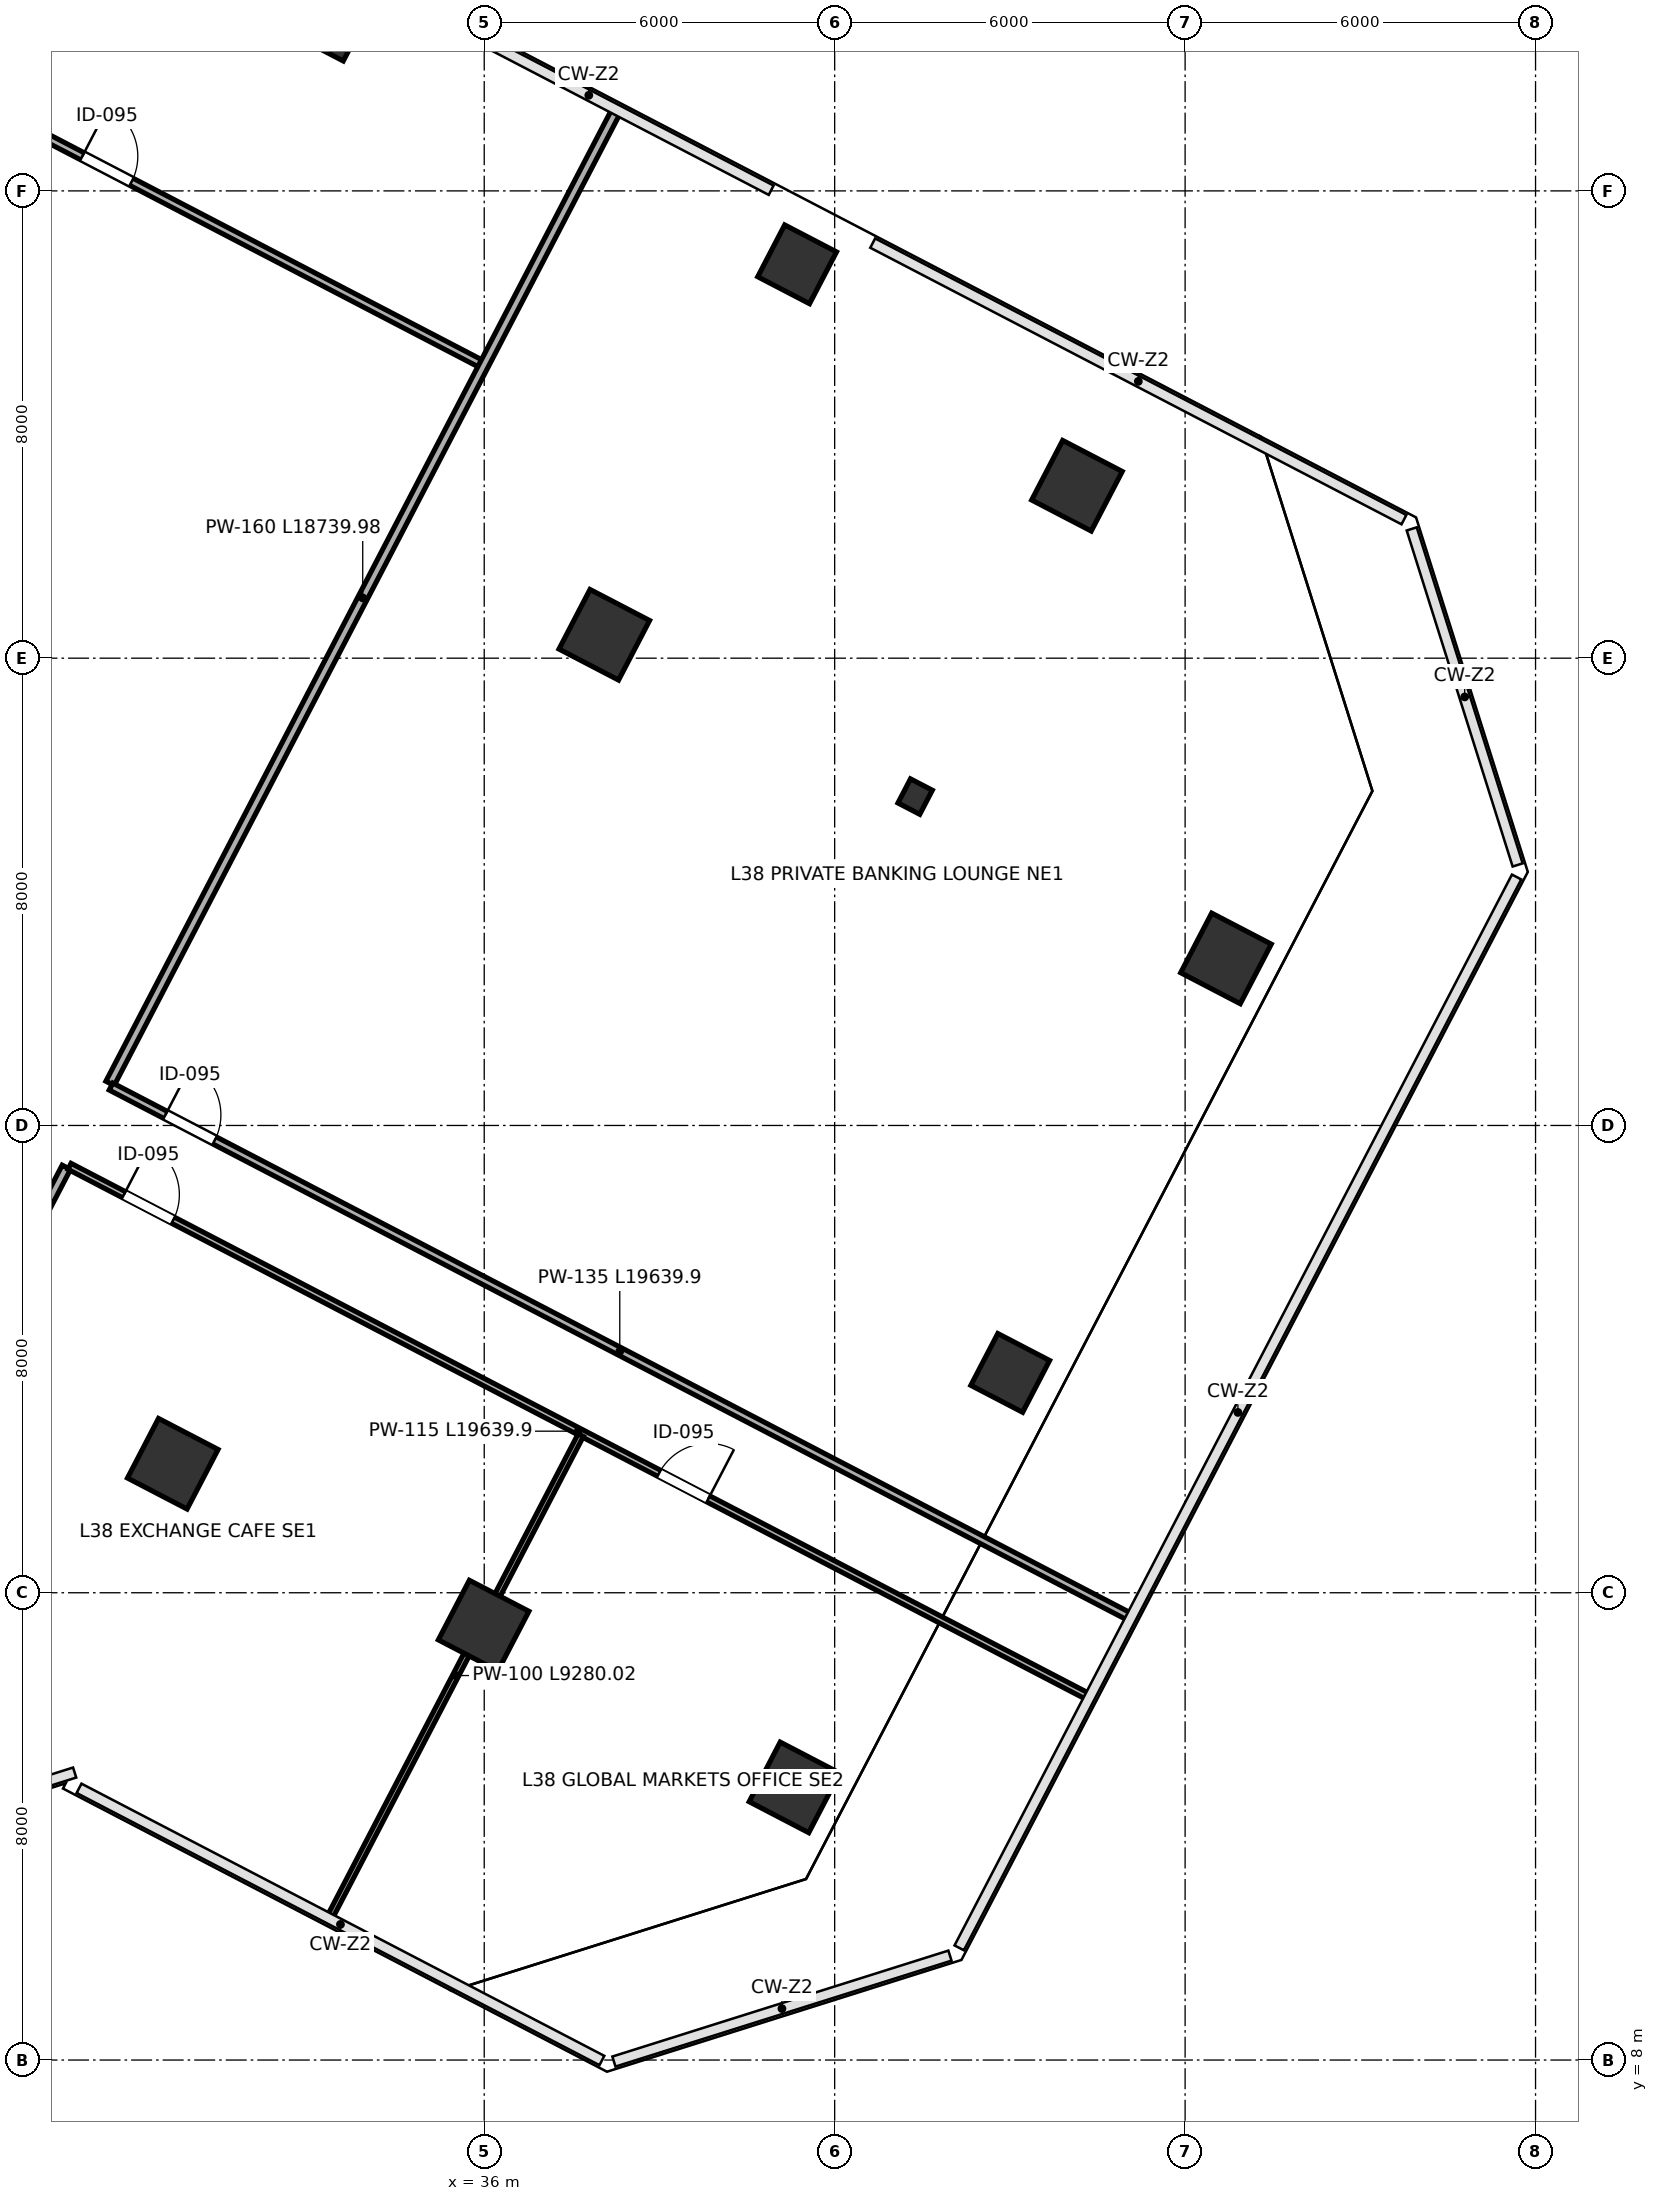
"""IFC4 building model, lengths in metres.
Left out: names, types, materials, properties, quantities, classifications, styles, units other than length and angle.
Written with IfcOpenShell. Run it as: python <this file> out.ifc"""

import sys

from ifc_helpers import new_model, si_unit, direction, frame, frame_2d, origin, origin_2d, place, context, subcontext, project, spatial, rectangle, i_section, extrude, clip, halfspace, source, transform, mapped, element, fill, save


model = new_model("IFC4")
c1 = context("Model", 3, precision=1e-05, world=origin(), true_north=direction((0.0, 1.0)))
c2 = subcontext(c1, "Body", "Model", "MODEL_VIEW")
j1 = project(units=[si_unit("LENGTHUNIT", "METRE"), si_unit("PLANEANGLEUNIT", "RADIAN")], contexts=[c1])
p1 = place(None, origin())
s1 = spatial("IfcSite", under=j1, at=p1, CompositionType="ELEMENT")
p2 = place(p1, origin())
s2 = spatial("IfcBuilding", under=s1, at=p2, CompositionType="ELEMENT")
p3 = place(p2, frame((0.0, 0.0, 170.8)))
s3 = spatial("IfcBuildingStorey", under=s2, at=p3, CompositionType="ELEMENT", Elevation=170.8)
p4 = place(p3, frame((33.374, 42.899, 0.0), z_axis=(0.055725496021, -0.062097434235, 0.996513210025), x_axis=(-0.96748864065, -0.2499629432, 0.038526059245)))
e1 = element("IfcColumn", 1, at=p4, inside=s3, PredefinedType="COLUMN", context=c2, shape_type="Clipping", body=[
    clip(clip(extrude(rectangle(XDim=1.0, YDim=1.0, at=origin_2d()), origin(), (0.0, 0.0, 1.0), 4.215), halfspace(frame((0.0, 0.0, 0.057), z_axis=(0.0, 0.0, -1.0), x_axis=(1.0, 0.0, 0.0)), False)), halfspace(frame((0.0, 0.0, 4.157), z_axis=(0.0, 0.0, 1.0), x_axis=(1.0, 0.0, 0.0)), False)),
])
p5 = place(p3, frame((30.668, 18.208, 0.0), z_axis=(-0.071930787685, -0.046679722121, 0.996316699311), x_axis=(-0.096954290528, 0.99450093611, 0.039594868666)))
e2 = element("IfcColumn", 2, at=p5, inside=s3, PredefinedType="COLUMN", context=c2, shape_type="Clipping", body=[
    clip(clip(extrude(rectangle(XDim=1.15, YDim=1.15, at=origin_2d()), origin(), (0.0, 0.0, 1.0), 4.216), halfspace(frame((0.0, 0.0, 0.067), z_axis=(0.0, 0.0, -1.0), x_axis=(1.0, 0.0, 0.0)), False)), halfspace(frame((0.0, 0.0, 4.148), z_axis=(0.0, 0.0, 1.0), x_axis=(1.0, 0.0, 0.0)), False)),
])
p6 = place(p3, frame((38.056, 32.401, 0.0), z_axis=(0.001100398588, -0.085657342736, 0.996324048068), x_axis=(-0.892847218174, 0.44861923, 0.039555422793)))
e3 = element("IfcColumn", 3, at=p6, inside=s3, PredefinedType="COLUMN", context=c2, shape_type="Clipping", body=[
    clip(clip(extrude(rectangle(XDim=1.15, YDim=1.15, at=origin_2d()), origin(), (0.0, 0.0, 1.0), 4.215), halfspace(frame((0.0, 0.0, 0.067), z_axis=(0.0, 0.0, -1.0), x_axis=(1.0, 0.0, 0.0)), False)), halfspace(frame((0.0, 0.0, 4.148), z_axis=(0.0, 0.0, 1.0), x_axis=(1.0, 0.0, 0.0)), False)),
])
p7 = place(p3, frame((41.357, 38.743, 0.0), z_axis=(0.03369013316, -0.102919600613, 0.994118972124), x_axis=(-0.985800109139, 0.160305053579, 0.050004345989)))
e4 = element("IfcColumn", 4, at=p7, inside=s3, PredefinedType="COLUMN", context=c2, shape_type="Clipping", body=[
    clip(clip(extrude(rectangle(XDim=1.0, YDim=1.0, at=origin_2d()), origin(), (0.0, 0.0, 1.0), 4.225), halfspace(frame((0.0, 0.0, 0.074), z_axis=(0.0, 0.0, -1.0), x_axis=(1.0, 0.0, 0.0)), False)), halfspace(frame((0.0, 0.0, 4.151), z_axis=(0.0, 0.0, 1.0), x_axis=(1.0, 0.0, 0.0)), False)),
])
p8 = place(p3, frame((35.99, 15.438, 0.0), z_axis=(-0.086283669312, -0.073808921942, 0.993532773215), x_axis=(-0.227975249338, 0.972254300779, 0.052429574719)))
e5 = element("IfcColumn", 5, at=p8, inside=s3, PredefinedType="COLUMN", context=c2, shape_type="Clipping", body=[
    clip(clip(extrude(rectangle(XDim=1.15, YDim=1.15, at=origin_2d()), origin(), (0.0, 0.0, 1.0), 4.227), halfspace(frame((0.0, 0.0, 0.089), z_axis=(0.0, 0.0, -1.0), x_axis=(1.0, 0.0, 0.0)), False)), halfspace(frame((0.0, 0.0, 4.138), z_axis=(0.0, 0.0, 1.0), x_axis=(1.0, 0.0, 0.0)), False)),
])
p9 = place(p3, frame((43.378, 29.63, 0.0), z_axis=(-0.013456572507, -0.112734890699, 0.993533977816), x_axis=(-0.826384390442, 0.560660761315, 0.052424707499)))
e6 = element("IfcColumn", 6, at=p9, inside=s3, PredefinedType="COLUMN", context=c2, shape_type="Clipping", body=[
    clip(clip(extrude(i_section(OverallWidth=0.421, OverallDepth=0.465, WebThickness=0.045, FlangeThickness=0.072, FilletRadius=0.015, at=origin_2d()), origin(), (0.0, 0.0, 1.0), 4.227), halfspace(frame((0.0, 0.0, 0.035), z_axis=(0.0, 0.0, -1.0), x_axis=(1.0, 0.0, 0.0)), False)), halfspace(frame((0.0, 0.0, 4.192), z_axis=(0.0, 0.0, 1.0), x_axis=(1.0, 0.0, 0.0)), False)),
])
p10 = place(p3, frame((46.148, 34.952, 0.0), z_axis=(0.013836421614, -0.127179775337, 0.991783170951), x_axis=(-0.931338098159, 0.359332565542, 0.05907160281)))
e7 = element("IfcColumn", 7, at=p10, inside=s3, PredefinedType="COLUMN", context=c2, shape_type="Clipping", body=[
    clip(clip(extrude(rectangle(XDim=1.15, YDim=1.15, at=origin_2d()), origin(), (0.0, 0.0, 1.0), 4.235), halfspace(frame((0.0, 0.0, 0.101), z_axis=(0.0, 0.0, -1.0), x_axis=(1.0, 0.0, 0.0)), False)), halfspace(frame((0.0, 0.0, 4.134), z_axis=(0.0, 0.0, 1.0), x_axis=(1.0, 0.0, 0.0)), False)),
])
p11 = place(p3, frame((41.312, 12.667, 0.0), z_axis=(-0.100518365868, -0.100748516677, 0.989821092173), x_axis=(-0.305115855174, 0.950045198756, 0.065714802304)))
e8 = element("IfcColumn", 8, at=p11, inside=s3, PredefinedType="COLUMN", context=c2, shape_type="Clipping", body=[
    clip(clip(extrude(rectangle(XDim=1.15, YDim=1.15, at=origin_2d()), origin(), (0.0, 0.0, 1.0), 4.243), halfspace(frame((0.0, 0.0, 0.112), z_axis=(0.0, 0.0, -1.0), x_axis=(1.0, 0.0, 0.0)), False)), halfspace(frame((0.0, 0.0, 4.131), z_axis=(0.0, 0.0, 1.0), x_axis=(1.0, 0.0, 0.0)), False)),
])
p12 = place(p3, frame((45.006, 19.764, 0.0), z_axis=(-0.064266651726, -0.120240832262, 0.990662374239), x_axis=(-0.566657550047, 0.821544902927, 0.062953899405)))
e9 = element("IfcColumn", 9, at=p12, inside=s3, PredefinedType="COLUMN", context=c2, shape_type="Clipping", body=[
    clip(clip(extrude(rectangle(XDim=1.0, YDim=1.0, at=origin_2d()), origin(), (0.0, 0.0, 1.0), 4.24), halfspace(frame((0.0, 0.0, 0.094), z_axis=(0.0, 0.0, -1.0), x_axis=(1.0, 0.0, 0.0)), False)), halfspace(frame((0.0, 0.0, 4.146), z_axis=(0.0, 0.0, 1.0), x_axis=(1.0, 0.0, 0.0)), False)),
])
p13 = place(p3, frame((48.7, 26.86, 0.0), z_axis=(-0.027905885377, -0.139529426887, 0.989824631232), x_axis=(-0.780150773, 0.622131682142, 0.065703435697)))
e10 = element("IfcColumn", 10, at=p13, inside=s3, PredefinedType="COLUMN", context=c2, shape_type="Clipping", body=[
    clip(clip(extrude(rectangle(XDim=1.15, YDim=1.15, at=origin_2d()), origin(), (0.0, 0.0, 1.0), 4.243), halfspace(frame((0.0, 0.0, 0.112), z_axis=(0.0, 0.0, -1.0), x_axis=(1.0, 0.0, 0.0)), False)), halfspace(frame((0.0, 0.0, 4.131), z_axis=(0.0, 0.0, 1.0), x_axis=(1.0, 0.0, 0.0)), False)),
])
p14 = place(p3, frame((11.104, 49.971, 0.0), z_axis=(0.0, 0.0, 1.0), x_axis=(0.887010001249, -0.461750211353, 0.0)))
e11 = element("IfcWall", 11, at=p14, inside=s3, PredefinedType="PARTITIONING", context=c2, shape_type="SweptSolid", body=[
    extrude(rectangle(XDim=28.02, YDim=0.135, at=frame_2d((14.01, 0.0))), origin(), (0.0, 0.0, 1.0), 3.96),
])
p15 = place(p14, frame((20.31, 0.0, 0.0)))
e12 = element("IfcOpeningElement", 12, at=p15, cuts=e11, PredefinedType="OPENING", context=c2, shape_type="SweptSolid", body=[
    extrude(rectangle(XDim=0.95, YDim=2.15, at=frame_2d((0.475, 1.075))), frame((0.0, 0.078, 0.0), z_axis=(0.0, -1.0, 0.0), x_axis=(1.0, 0.0, 0.0)), (0.0, 0.0, 1.0), 0.155),
])
p16 = place(p3, frame((29.593, 24.72, 0.0), z_axis=(0.0, 0.0, 1.0), x_axis=(0.461745249096, 0.88701258443, 0.0)))
e13 = element("IfcWall", 13, at=p16, inside=s3, PredefinedType="PARTITIONING", context=c2, shape_type="SweptSolid", body=[
    extrude(rectangle(XDim=18.74, YDim=0.16, at=frame_2d((9.37, 0.0))), origin(), (0.0, 0.0, 1.0), 3.195),
])
p17 = place(p3, frame((22.528, 11.149, 0.0), z_axis=(0.0, 0.0, 1.0), x_axis=(0.461766825398, 0.887001352289, 0.0)))
e14 = element("IfcWall", 14, at=p17, inside=s3, PredefinedType="PARTITIONING", context=c2, shape_type="SweptSolid", body=[
    extrude(rectangle(XDim=13.68, YDim=0.16, at=frame_2d((6.84, 0.0))), origin(), (0.0, 0.0, 1.0), 3.96),
])
p18 = place(p3, frame((29.61, 24.667, 0.0), z_axis=(0.0, 0.0, 1.0), x_axis=(0.887013798673, -0.461742916527, 0.0)))
e15 = element("IfcWall", 15, at=p18, inside=s3, PredefinedType="PARTITIONING", context=c2, shape_type="SweptSolid", body=[
    extrude(rectangle(XDim=19.64, YDim=0.135, at=frame_2d((9.82, 0.0))), origin(), (0.0, 0.0, 1.0), 3.252),
])
p19 = place(p18, frame((1.05, 0.0, 0.0)))
e16 = element("IfcOpeningElement", 16, at=p19, cuts=e15, PredefinedType="OPENING", context=c2, shape_type="SweptSolid", body=[
    extrude(rectangle(XDim=0.95, YDim=2.15, at=frame_2d((0.475, 1.075))), frame((0.0, 0.078, 0.0), z_axis=(0.0, -1.0, 0.0), x_axis=(1.0, 0.0, 0.0)), (0.0, 0.0, 1.0), 0.155),
])
p20 = place(p3, frame((28.899, 23.301, 0.0), z_axis=(0.0, 0.0, 1.0), x_axis=(0.887006056854, -0.461757788353, 0.0)))
e17 = element("IfcWall", 17, at=p20, inside=s3, PredefinedType="PARTITIONING", context=c2, shape_type="SweptSolid", body=[
    extrude(rectangle(XDim=19.64, YDim=0.115, at=frame_2d((9.82, 0.0))), origin(), (0.0, 0.0, 1.0), 3.252),
])
p21 = place(p20, frame((1.05, 0.0, 0.0)))
e18 = element("IfcOpeningElement", 18, at=p21, cuts=e17, PredefinedType="OPENING", context=c2, shape_type="SweptSolid", body=[
    extrude(rectangle(XDim=0.95, YDim=2.15, at=frame_2d((0.475, 1.075))), frame((0.0, 0.067, 0.0), z_axis=(0.0, -1.0, 0.0), x_axis=(1.0, 0.0, 0.0)), (0.0, 0.0, 1.0), 0.135),
])
p22 = place(p20, frame((11.38, 0.0, 0.0)))
e19 = element("IfcOpeningElement", 19, at=p22, cuts=e17, PredefinedType="OPENING", context=c2, shape_type="SweptSolid", body=[
    extrude(rectangle(XDim=0.95, YDim=2.15, at=frame_2d((0.475, 1.075))), frame((0.0, 0.067, 0.0), z_axis=(0.0, -1.0, 0.0), x_axis=(1.0, 0.0, 0.0)), (0.0, 0.0, 1.0), 0.135),
])
p23 = place(p3, frame((33.368, 10.467, 0.0), z_axis=(0.0, 0.0, 1.0), x_axis=(0.461728758034, 0.887021168859, 0.0)))
e20 = element("IfcWall", 20, at=p23, inside=s3, PredefinedType="PARTITIONING", context=c2, shape_type="SweptSolid", body=[
    extrude(rectangle(XDim=9.28, YDim=0.1, at=frame_2d((4.64, 0.0))), origin(), (0.0, 0.0, 1.0), 3.96),
])
m1 = source(origin(), c2, "Body", "SweptSolid", [
    extrude(rectangle(XDim=0.95, YDim=2.15, at=frame_2d((0.475, 1.075))), frame((0.0, 0.025, 0.0), z_axis=(0.0, -1.0, 0.0), x_axis=(1.0, 0.0, 0.0)), (0.0, 0.0, 1.0), 0.05),
])
p24 = place(p15, origin())
e21 = element("IfcDoor", 21, at=p24, inside=s3, OperationType="SINGLE_SWING_LEFT", PredefinedType="DOOR", context=c2, shape_type="MappedRepresentation", body=[
    mapped(m1, transform((0.0, 0.0, 0.0), scale=1.0)),
])
fill(e12, e21)
p25 = place(p19, origin())
e22 = element("IfcDoor", 22, at=p25, inside=s3, OperationType="SINGLE_SWING_LEFT", PredefinedType="DOOR", context=c2, shape_type="MappedRepresentation", body=[
    mapped(m1, transform((0.0, 0.0, 0.0), scale=1.0)),
])
fill(e16, e22)
p26 = place(p21, origin())
e23 = element("IfcDoor", 23, at=p26, inside=s3, OperationType="SINGLE_SWING_LEFT", PredefinedType="DOOR", context=c2, shape_type="MappedRepresentation", body=[
    mapped(m1, transform((0.0, 0.0, 0.0), scale=1.0)),
])
fill(e18, e23)
p27 = place(p22, origin())
e24 = element("IfcDoor", 24, at=p27, inside=s3, OperationType="SINGLE_SWING_RIGHT", PredefinedType="DOOR", context=c2, shape_type="MappedRepresentation", body=[
    mapped(m1, transform((0.0, 0.0, 0.0), scale=1.0)),
])
fill(e19, e24)
save(model, sys.argv[1])
